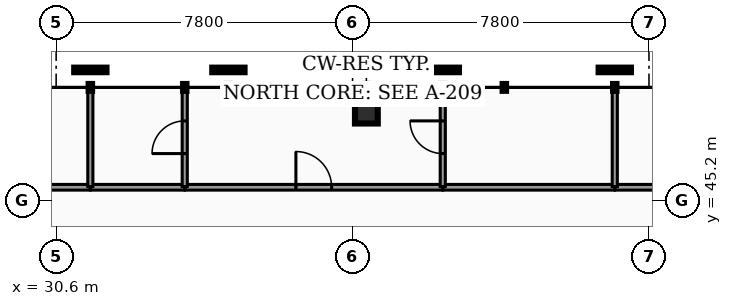
"""IFC4 building model, lengths in metres.
Left out: names, types, materials, properties, quantities, classifications, styles, units other than length and angle.
Written with IfcOpenShell. Run it as: python <this file> out.ifc"""

import sys

from ifc_helpers import new_model, si_unit, direction, frame, frame_2d, origin, origin_2d, place, context, subcontext, project, spatial, rectangle, hollow_rectangle, extrude, element, fill, save


model = new_model("IFC4")
c1 = context("Model", 3, precision=1e-05, world=origin(), true_north=direction((0.0, 1.0)))
c2 = subcontext(c1, "Body", "Model", "MODEL_VIEW")
j1 = project(units=[si_unit("LENGTHUNIT", "METRE"), si_unit("PLANEANGLEUNIT", "RADIAN")], contexts=[c1])
p1 = place(None, origin())
s1 = spatial("IfcSite", under=j1, at=p1, CompositionType="ELEMENT")
p2 = place(p1, origin())
s2 = spatial("IfcBuilding", under=s1, at=p2, CompositionType="ELEMENT")
p3 = place(p2, frame((0.0, 0.0, 235.96)))
s3 = spatial("IfcBuildingStorey", under=s2, at=p3, CompositionType="ELEMENT", Elevation=235.96)
p4 = place(p3, frame((38.763, 47.528, 0.0), z_axis=(-0.005830908441, -0.036673345194, 0.999310295283), x_axis=(0.987594874064, -0.15702345278, 0.0)))
e1 = element("IfcColumn", 1, at=p4, inside=s3, PredefinedType="COLUMN", context=c2, shape_type="SweptSolid", body=[
    extrude(hollow_rectangle(XDim=0.6, YDim=0.6, WallThickness=0.03, at=origin_2d()), origin(), (0.0, 0.0, 1.0), 3.182),
])
p5 = place(p3, frame((28.55, 45.55, 0.0), z_axis=(0.0, 0.0, 1.0), x_axis=(1.0, 0.0, 0.0)))
e2 = element("IfcWall", 2, at=p5, inside=s3, PredefinedType="PARTITIONING", context=c2, shape_type="SweptSolid", body=[
    extrude(rectangle(XDim=2.945, YDim=0.15, at=frame_2d((1.473, 0.0))), origin(), (0.0, 0.0, 1.0), 2.235),
])
p6 = place(p3, frame((45.305, 45.55, 0.0), z_axis=(0.0, 0.0, 1.0), x_axis=(1.0, 0.0, 0.0)))
e3 = element("IfcWall", 3, at=p6, inside=s3, PredefinedType="PARTITIONING", context=c2, shape_type="SweptSolid", body=[
    extrude(rectangle(XDim=3.045, YDim=0.15, at=frame_2d((1.522, 0.0))), origin(), (0.0, 0.0, 1.0), 2.235),
])
p7 = place(p3, frame((33.989, 45.55, 0.0), z_axis=(0.0, 0.0, 1.0), x_axis=(1.0, 0.0, 0.0)))
e4 = element("IfcWall", 4, at=p7, inside=s3, PredefinedType="PARTITIONING", context=c2, shape_type="SweptSolid", body=[
    extrude(rectangle(XDim=6.78, YDim=0.15, at=frame_2d((3.39, 0.0))), origin(), (0.0, 0.0, 1.0), 2.235),
])
p8 = place(p7, frame((2.92, 0.0, 0.0)))
e5 = element("IfcOpeningElement", 5, at=p8, cuts=e4, PredefinedType="OPENING", context=c2, shape_type="SweptSolid", body=[
    extrude(rectangle(XDim=0.94, YDim=2.05, at=frame_2d((0.47, 1.025))), frame((0.0, 0.085, 0.0), z_axis=(0.0, -1.0, 0.0), x_axis=(1.0, 0.0, 0.0)), (0.0, 0.0, 1.0), 0.17),
])
p9 = place(p3, frame((40.779, 45.55, 0.0), z_axis=(0.0, 0.0, 1.0), x_axis=(1.0, 0.0, 0.0)))
e6 = element("IfcWall", 6, at=p9, inside=s3, PredefinedType="PARTITIONING", context=c2, shape_type="SweptSolid", body=[
    extrude(rectangle(XDim=4.516, YDim=0.15, at=frame_2d((2.258, 0.0))), origin(), (0.0, 0.0, 1.0), 2.235),
])
p10 = place(p3, frame((31.505, 45.55, 0.0), z_axis=(0.0, 0.0, 1.0), x_axis=(1.0, 0.0, 0.0)))
e7 = element("IfcWall", 7, at=p10, inside=s3, PredefinedType="PARTITIONING", context=c2, shape_type="SweptSolid", body=[
    extrude(rectangle(XDim=2.474, YDim=0.15, at=frame_2d((1.237, 0.0))), origin(), (0.0, 0.0, 1.0), 2.235),
])
for number, where, z_axis, x_axis in (
    (8, (31.5, 45.57, 0.0), (0.0, 0.0, 1.0), (0.0, 1.0, 0.0)),
    (9, (45.3, 45.57, 0.0), (0.0, 0.0, 1.0), (0.0, 1.0, 0.0)),
):
    element("IfcWall", number, at=place(p3, frame(where, z_axis=z_axis, x_axis=x_axis)), inside=s3, PredefinedType="PARTITIONING", context=c2, shape_type="SweptSolid", body=[
        extrude(rectangle(XDim=2.593, YDim=0.135, at=frame_2d((1.296, 0.0))), origin(), (0.0, 0.0, 1.0), 2.235),
    ])
p11 = place(p3, frame((40.774, 45.57, 0.0), z_axis=(0.0, 0.0, 1.0), x_axis=(0.0, 1.0, 0.0)))
e10 = element("IfcWall", 10, at=p11, inside=s3, PredefinedType="PARTITIONING", context=c2, shape_type="SweptSolid", body=[
    extrude(rectangle(XDim=2.593, YDim=0.135, at=frame_2d((1.296, 0.0))), origin(), (0.0, 0.0, 1.0), 2.235),
])
p12 = place(p11, frame((0.866, 0.0, 0.0)))
e11 = element("IfcOpeningElement", 11, at=p12, cuts=e10, PredefinedType="OPENING", context=c2, shape_type="SweptSolid", body=[
    extrude(rectangle(XDim=0.86, YDim=2.05, at=frame_2d((0.43, 1.025))), frame((0.0, 0.077, 0.0), z_axis=(0.0, -1.0, 0.0), x_axis=(1.0, 0.0, 0.0)), (0.0, 0.0, 1.0), 0.155),
])
p13 = place(p3, frame((33.984, 45.57, 0.0), z_axis=(0.0, 0.0, 1.0), x_axis=(0.0, 1.0, 0.0)))
e12 = element("IfcWall", 12, at=p13, inside=s3, PredefinedType="PARTITIONING", context=c2, shape_type="SweptSolid", body=[
    extrude(rectangle(XDim=2.593, YDim=0.135, at=frame_2d((1.296, 0.0))), origin(), (0.0, 0.0, 1.0), 2.235),
])
p14 = place(p13, frame((0.866, 0.0, 0.0)))
e13 = element("IfcOpeningElement", 13, at=p14, cuts=e12, PredefinedType="OPENING", context=c2, shape_type="SweptSolid", body=[
    extrude(rectangle(XDim=0.86, YDim=2.05, at=frame_2d((0.43, 1.025))), frame((0.0, 0.077, 0.0), z_axis=(0.0, -1.0, 0.0), x_axis=(1.0, 0.0, 0.0)), (0.0, 0.0, 1.0), 0.155),
])
p15 = place(p8, origin())
e14 = element("IfcDoor", 14, at=p15, inside=s3, OperationType="SINGLE_SWING_LEFT", PredefinedType="DOOR", context=c2, shape_type="SweptSolid", body=[
    extrude(rectangle(XDim=0.94, YDim=2.05, at=frame_2d((0.47, 1.025))), frame((0.0, 0.025, 0.0), z_axis=(0.0, -1.0, 0.0), x_axis=(1.0, 0.0, 0.0)), (0.0, 0.0, 1.0), 0.05),
])
fill(e5, e14)
p16 = place(p12, origin())
e15 = element("IfcDoor", 15, at=p16, inside=s3, OperationType="SINGLE_SWING_RIGHT", PredefinedType="DOOR", context=c2, shape_type="SweptSolid", body=[
    extrude(rectangle(XDim=0.86, YDim=2.05, at=frame_2d((0.43, 1.025))), frame((0.0, 0.025, 0.0), z_axis=(0.0, -1.0, 0.0), x_axis=(1.0, 0.0, 0.0)), (0.0, 0.0, 1.0), 0.05),
])
fill(e11, e15)
p17 = place(p14, origin())
e16 = element("IfcDoor", 16, at=p17, inside=s3, OperationType="SINGLE_SWING_LEFT", PredefinedType="DOOR", context=c2, shape_type="SweptSolid", body=[
    extrude(rectangle(XDim=0.86, YDim=2.05, at=frame_2d((0.43, 1.025))), frame((0.0, 0.025, 0.0), z_axis=(0.0, -1.0, 0.0), x_axis=(1.0, 0.0, 0.0)), (0.0, 0.0, 1.0), 0.05),
])
fill(e13, e16)
save(model, sys.argv[1])
